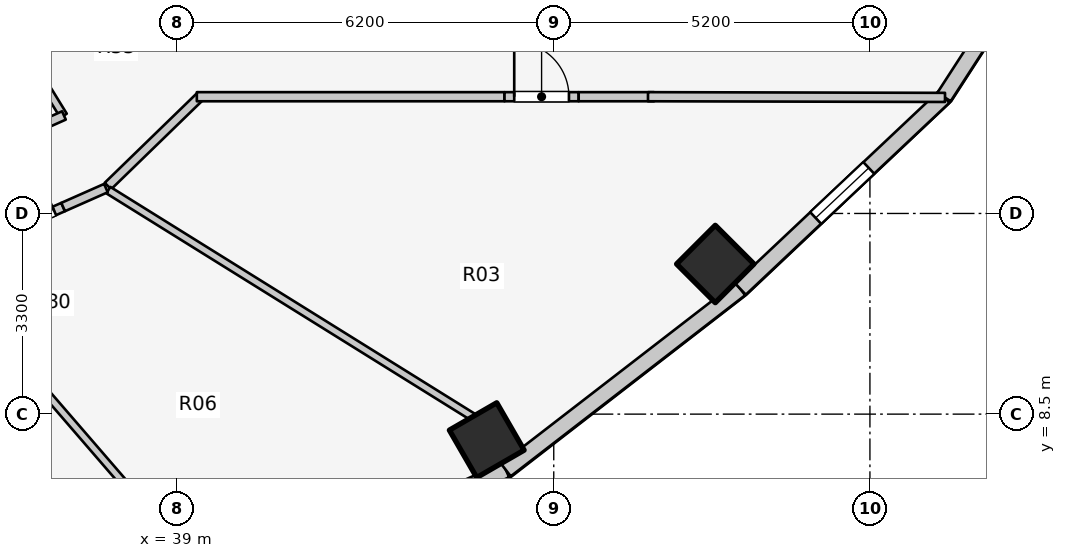
"""IFC4 building model, lengths in metres.
Left out: names, types, materials, properties, quantities, classifications, styles, units other than length and angle.
Written with IfcOpenShell. Run it as: python <this file> out.ifc"""

import sys

from ifc_helpers import new_model, si_unit, direction, frame, frame_2d, origin, origin_2d, place, context, subcontext, project, spatial, rectangle, extrude, element, fill, save


model = new_model("IFC4")
c1 = context("Model", 3, precision=1e-05, world=origin(), true_north=direction((0.0, 1.0)))
c2 = subcontext(c1, "Body", "Model", "MODEL_VIEW")
j1 = project(units=[si_unit("LENGTHUNIT", "METRE"), si_unit("PLANEANGLEUNIT", "RADIAN")], contexts=[c1])
p1 = place(None, origin())
s1 = spatial("IfcSite", under=j1, at=p1, CompositionType="ELEMENT")
p2 = place(p1, origin())
s2 = spatial("IfcBuilding", under=s1, at=p2, CompositionType="ELEMENT")
p3 = place(p2, frame((0.0, 0.0, 140.5)))
s3 = spatial("IfcBuildingStorey", under=s2, at=p3, CompositionType="ELEMENT", Elevation=140.5)
for number, where, z_axis, x_axis in (
    (1, (44.098, 8.072, 0.0), (0.0, 0.0, 1.0), (0.5, -0.866, 0.0)),
    (2, (47.857, 10.969, 0.0), (0.0, 0.0, 1.0), (0.707, -0.707, 0.0)),
):
    element("IfcColumn", number, at=place(p3, frame(where, z_axis=z_axis, x_axis=x_axis)), inside=s3, PredefinedType="COLUMN", context=c2, shape_type="SweptSolid", body=[
        extrude(rectangle(XDim=0.9, YDim=0.9, at=origin_2d()), origin(), (0.0, 0.0, 1.0), 3.1),
    ])
p4 = place(p3, frame((39.365, 5.315, 0.0), z_axis=(0.0, 0.0, 1.0), x_axis=(0.912353637112, 0.409403029847, 0.0)))
e3 = element("IfcWall", 3, at=p4, inside=s3, PredefinedType="STANDARD", context=c2, shape_type="SweptSolid", body=[
    extrude(rectangle(XDim=5.533, YDim=0.26, at=frame_2d((2.766, 0.0))), origin(), (0.0, 0.0, 1.0), 1.22),
])
p5 = place(p4, frame((2.167, 0.0, 0.15)))
e4 = element("IfcOpeningElement", 4, at=p5, cuts=e3, PredefinedType="OPENING", context=c2, shape_type="SweptSolid", body=[
    extrude(rectangle(XDim=1.2, YDim=0.9, at=frame_2d((0.6, 0.45))), frame((0.0, 0.14, 0.0), z_axis=(0.0, -1.0, 0.0), x_axis=(1.0, 0.0, 0.0)), (0.0, 0.0, 1.0), 0.28),
])
p6 = place(p3, frame((44.413, 7.581, 0.0), z_axis=(0.0, 0.0, 1.0), x_axis=(0.791460185804, 0.611220724687, 0.0)))
e5 = element("IfcWall", 5, at=p6, inside=s3, PredefinedType="STANDARD", context=c2, shape_type="SweptSolid", body=[
    extrude(rectangle(XDim=4.872, YDim=0.26, at=frame_2d((2.436, 0.0))), origin(), (0.0, 0.0, 1.0), 1.22),
])
p7 = place(p3, frame((48.269, 10.559, 0.0), z_axis=(0.0, 0.0, 1.0), x_axis=(0.727667301037, 0.68593024354, 0.0)))
e6 = element("IfcWall", 6, at=p7, inside=s3, PredefinedType="STANDARD", context=c2, shape_type="SweptSolid", body=[
    extrude(rectangle(XDim=4.604, YDim=0.26, at=frame_2d((2.302, 0.0))), origin(), (0.0, 0.0, 1.0), 1.22),
])
p8 = place(p7, frame((1.702, 0.0, 0.15)))
e7 = element("IfcOpeningElement", 7, at=p8, cuts=e6, PredefinedType="OPENING", context=c2, shape_type="SweptSolid", body=[
    extrude(rectangle(XDim=1.2, YDim=0.9, at=frame_2d((0.6, 0.45))), frame((0.0, 0.14, 0.0), z_axis=(0.0, -1.0, 0.0), x_axis=(1.0, 0.0, 0.0)), (0.0, 0.0, 1.0), 0.28),
])
p9 = place(p3, frame((51.619, 13.716, 0.0), z_axis=(0.0, 0.0, 1.0), x_axis=(0.543358984534, 0.839500454989, 0.0)))
e8 = element("IfcWall", 8, at=p9, inside=s3, PredefinedType="STANDARD", context=c2, shape_type="SweptSolid", body=[
    extrude(rectangle(XDim=4.511, YDim=0.26, at=frame_2d((2.256, 0.0))), origin(), (0.0, 0.0, 1.0), 1.22),
])
p10 = place(p9, frame((1.656, 0.0, 0.15)))
e9 = element("IfcOpeningElement", 9, at=p10, cuts=e8, PredefinedType="OPENING", context=c2, shape_type="SweptSolid", body=[
    extrude(rectangle(XDim=1.2, YDim=0.9, at=frame_2d((0.6, 0.45))), frame((0.0, 0.14, 0.0), z_axis=(0.0, -1.0, 0.0), x_axis=(1.0, 0.0, 0.0)), (0.0, 0.0, 1.0), 0.28),
])
p11 = place(p3, frame((37.867, 12.251, 0.0), z_axis=(0.0, 0.0, 1.0), x_axis=(0.717419568599, 0.696641344302, 0.0)))
e10 = element("IfcWall", 10, at=p11, inside=s3, PredefinedType="PARTITIONING", context=c2, shape_type="SweptSolid", body=[
    extrude(rectangle(XDim=2.138, YDim=0.15, at=frame_2d((1.069, 0.0))), origin(), (0.0, 0.0, 1.0), 2.019),
])
p12 = place(p3, frame((39.33, 13.72, 0.0), z_axis=(0.0, 0.0, 1.0), x_axis=(1.0, 0.0, 0.0)))
e11 = element("IfcWall", 11, at=p12, inside=s3, PredefinedType="PARTITIONING", context=c2, shape_type="SweptSolid", body=[
    extrude(rectangle(XDim=5.06, YDim=0.15, at=frame_2d((2.53, 0.0))), origin(), (0.0, 0.0, 1.0), 2.019),
])
p13 = place(p3, frame((44.39, 13.72, 0.0), z_axis=(0.0, 0.0, 1.0), x_axis=(1.0, 0.0, 0.0)))
e12 = element("IfcWall", 12, at=p13, inside=s3, PredefinedType="PARTITIONING", context=c2, shape_type="SweptSolid", body=[
    extrude(rectangle(XDim=1.22, YDim=0.15, at=frame_2d((0.61, 0.0))), origin(), (0.0, 0.0, 1.0), 2.575),
])
p14 = place(p13, frame((0.16, 0.0, 0.0)))
e13 = element("IfcOpeningElement", 13, at=p14, cuts=e12, PredefinedType="OPENING", context=c2, shape_type="SweptSolid", body=[
    extrude(rectangle(XDim=0.9, YDim=2.1, at=frame_2d((0.45, 1.05))), frame((0.0, 0.085, 0.0), z_axis=(0.0, -1.0, 0.0), x_axis=(1.0, 0.0, 0.0)), (0.0, 0.0, 1.0), 0.17),
])
p15 = place(p3, frame((45.61, 13.72, 0.0), z_axis=(0.0, 0.0, 1.0), x_axis=(1.0, 0.0, 0.0)))
e14 = element("IfcWall", 14, at=p15, inside=s3, PredefinedType="PARTITIONING", context=c2, shape_type="SweptSolid", body=[
    extrude(rectangle(XDim=1.24, YDim=0.15, at=frame_2d((0.62, 0.0))), origin(), (0.0, 0.0, 1.0), 2.575),
])
p16 = place(p3, frame((46.75, 13.72, 0.0), z_axis=(0.0, 0.0, 1.0), x_axis=(0.999997122315, -0.00239903348, 0.0)))
e15 = element("IfcWall", 15, at=p16, inside=s3, PredefinedType="PARTITIONING", context=c2, shape_type="SweptSolid", body=[
    extrude(rectangle(XDim=4.885, YDim=0.15, at=frame_2d((2.442, 0.0))), origin(), (0.0, 0.0, 1.0), 1.22),
])
p17 = place(p3, frame((35.55, 15.985, 0.0), z_axis=(0.0, 0.0, 1.0), x_axis=(0.524565340045, -0.851370192116, 0.0)))
e16 = element("IfcWall", 16, at=p17, inside=s3, PredefinedType="PARTITIONING", context=c2, shape_type="SweptSolid", body=[
    extrude(rectangle(XDim=3.027, YDim=0.125, at=frame_2d((1.514, 0.0))), origin(), (0.0, 0.0, 1.0), 2.019),
])
p18 = place(p3, frame((36.478, 13.115, 0.0), z_axis=(0.0, 0.0, 1.0), x_axis=(0.913120081969, 0.407690711084, 0.0)))
e17 = element("IfcWall", 17, at=p18, inside=s3, PredefinedType="PARTITIONING", context=c2, shape_type="SweptSolid", body=[
    extrude(rectangle(XDim=0.729, YDim=0.15, at=frame_2d((0.365, 0.0))), origin(), (0.0, 0.0, 1.0), 2.575),
])
p19 = place(p3, frame((35.053, 10.927, 0.0), z_axis=(0.0, 0.0, 1.0), x_axis=(0.653779283332, -0.756685303601, 0.0)))
e18 = element("IfcWall", 18, at=p19, inside=s3, PredefinedType="PARTITIONING", context=c2, shape_type="SweptSolid", body=[
    extrude(rectangle(XDim=6.14, YDim=0.125, at=frame_2d((3.07, 0.0))), origin(), (0.0, 0.0, 1.0), 1.22),
])
p20 = place(p3, frame((37.875, 12.184, 0.0), z_axis=(0.0, 0.0, 1.0), x_axis=(0.849008457073, -0.528379257559, 0.0)))
e19 = element("IfcWall", 19, at=p20, inside=s3, PredefinedType="PARTITIONING", context=c2, shape_type="SweptSolid", body=[
    extrude(rectangle(XDim=7.077, YDim=0.125, at=frame_2d((3.539, 0.0))), origin(), (0.0, 0.0, 1.0), 1.22),
])
p21 = place(p3, frame((35.924, 11.371, 0.0), z_axis=(0.0, 0.0, 1.0), x_axis=(0.914451103971, 0.404696402809, 0.0)))
e20 = element("IfcWall", 20, at=p21, inside=s3, PredefinedType="PARTITIONING", context=c2, shape_type="SweptSolid", body=[
    extrude(rectangle(XDim=1.32, YDim=0.15, at=frame_2d((0.66, 0.0))), origin(), (0.0, 0.0, 1.0), 2.16),
])
p22 = place(p21, frame((0.16, 0.0, 0.0)))
e21 = element("IfcOpeningElement", 21, at=p22, cuts=e20, PredefinedType="OPENING", context=c2, shape_type="SweptSolid", body=[
    extrude(rectangle(XDim=1.0, YDim=2.1, at=frame_2d((0.5, 1.05))), frame((0.0, 0.085, 0.0), z_axis=(0.0, -1.0, 0.0), x_axis=(1.0, 0.0, 0.0)), (0.0, 0.0, 1.0), 0.17),
])
p23 = place(p3, frame((37.131, 11.906, 0.0), z_axis=(0.0, 0.0, 1.0), x_axis=(0.914386304715, 0.404842791401, 0.0)))
e22 = element("IfcWall", 22, at=p23, inside=s3, PredefinedType="PARTITIONING", context=c2, shape_type="SweptSolid", body=[
    extrude(rectangle(XDim=0.77, YDim=0.15, at=frame_2d((0.385, 0.0))), origin(), (0.0, 0.0, 1.0), 2.575),
])
p24 = place(p8, origin())
e23 = element("IfcWindow", 23, at=p24, inside=s3, PartitioningType="SINGLE_PANEL", PredefinedType="WINDOW", context=c2, shape_type="SweptSolid", body=[
    extrude(rectangle(XDim=1.2, YDim=0.9, at=frame_2d((0.6, 0.45))), frame((0.0, 0.03, 0.0), z_axis=(0.0, -1.0, 0.0), x_axis=(1.0, 0.0, 0.0)), (0.0, 0.0, 1.0), 0.06),
])
fill(e7, e23)
p25 = place(p14, origin())
e24 = element("IfcDoor", 24, at=p25, inside=s3, OperationType="SINGLE_SWING_LEFT", PredefinedType="DOOR", context=c2, shape_type="SweptSolid", body=[
    extrude(rectangle(XDim=0.9, YDim=2.1, at=frame_2d((0.45, 1.05))), frame((0.0, 0.025, 0.0), z_axis=(0.0, -1.0, 0.0), x_axis=(1.0, 0.0, 0.0)), (0.0, 0.0, 1.0), 0.05),
])
fill(e13, e24)
p26 = place(p22, origin())
e25 = element("IfcDoor", 25, at=p26, inside=s3, OperationType="SINGLE_SWING_RIGHT", PredefinedType="DOOR", context=c2, shape_type="SweptSolid", body=[
    extrude(rectangle(XDim=1.0, YDim=2.1, at=frame_2d((0.5, 1.05))), frame((0.0, 0.025, 0.0), z_axis=(0.0, -1.0, 0.0), x_axis=(1.0, 0.0, 0.0)), (0.0, 0.0, 1.0), 0.05),
])
fill(e21, e25)
save(model, sys.argv[1])
